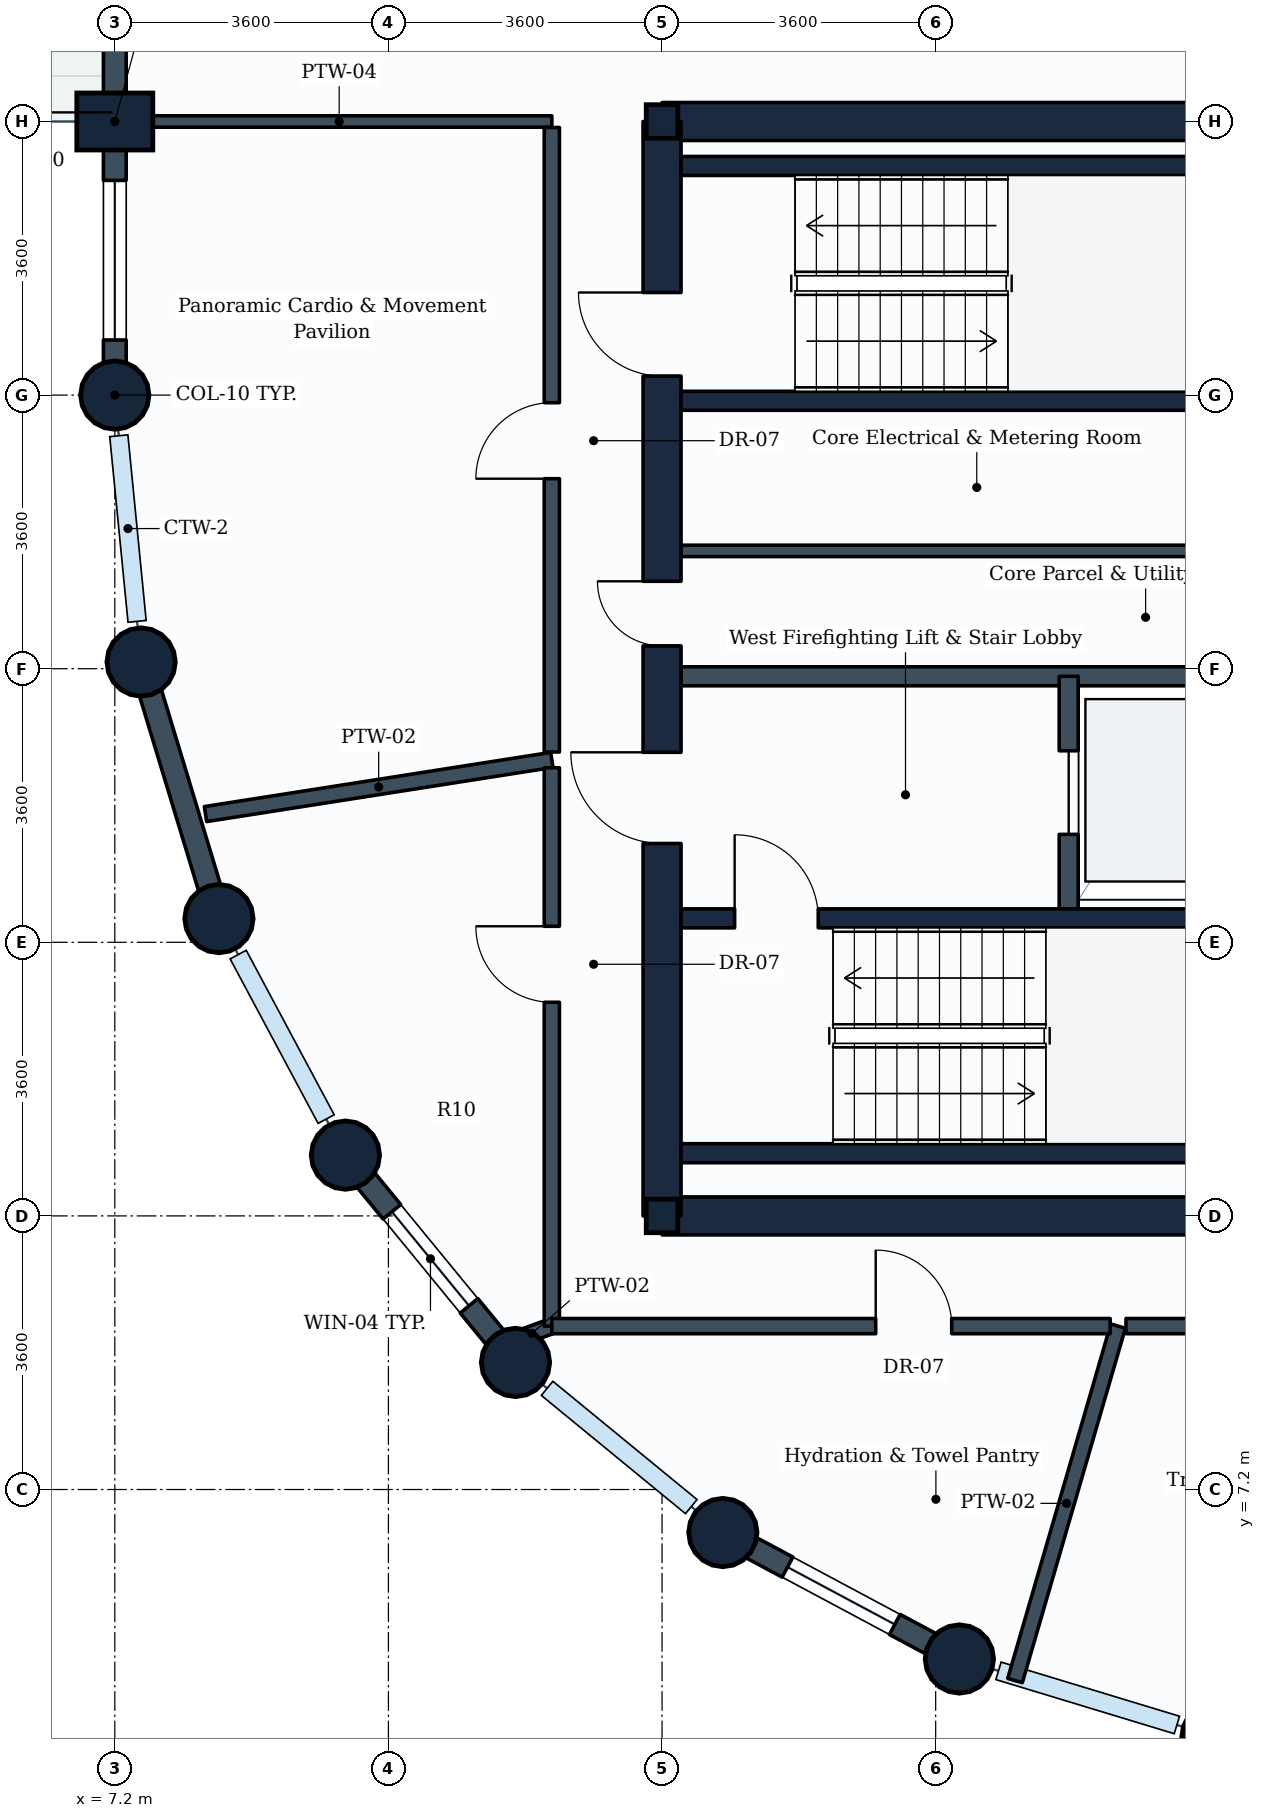
"""IFC4 building model, lengths in metres.
Left out: names, types, materials, properties, quantities, classifications, styles, units other than length and angle.
Written with IfcOpenShell. Run it as: python <this file> out.ifc"""

import sys

from ifc_helpers import new_model, si_unit, direction, frame, frame_2d, origin, origin_2d, place, context, subcontext, project, spatial, rectangle, circle, i_section, extrude, element, fill, save


model = new_model("IFC4")
c1 = context("Model", 3, precision=1e-05, world=origin(), true_north=direction((0.0, 1.0)))
c2 = subcontext(c1, "Body", "Model", "MODEL_VIEW")
j1 = project(units=[si_unit("LENGTHUNIT", "METRE"), si_unit("PLANEANGLEUNIT", "RADIAN")], contexts=[c1])
p1 = place(None, origin())
s1 = spatial("IfcSite", under=j1, at=p1, CompositionType="ELEMENT")
p2 = place(p1, origin())
s2 = spatial("IfcBuilding", under=s1, at=p2, CompositionType="ELEMENT")
p3 = place(p2, frame((0.0, 0.0, 146.6)))
s3 = spatial("IfcBuildingStorey", under=s2, at=p3, CompositionType="ELEMENT", Elevation=146.6)
p4 = place(p3, frame((7.2, 21.6, 0.0), z_axis=(0.0, 0.0, 1.0), x_axis=(1.0, 0.0, 0.0)))
e1 = element("IfcColumn", 1, at=p4, inside=s3, PredefinedType="COLUMN", context=c2, shape_type="SweptSolid", body=[
    extrude(circle(Radius=0.45, at=origin_2d()), origin(), (0.0, 0.0, 1.0), 3.8),
])
p5 = place(p3, frame((7.2, 25.2, 0.0), z_axis=(0.0, 0.0, 1.0), x_axis=(0.0, 1.0, 0.0)))
e2 = element("IfcColumn", 2, at=p5, inside=s3, PredefinedType="COLUMN", context=c2, shape_type="SweptSolid", body=[
    extrude(rectangle(XDim=0.75, YDim=1.0, at=origin_2d()), origin(), (0.0, 0.0, 1.0), 3.8),
])
for number, where, z_axis, x_axis in (
    (3, (7.546, 18.088, 0.0), (0.0, 0.0, 1.0), (1.0, 0.0, 0.0)),
    (4, (8.57, 14.712, 0.0), (0.0, 0.0, 1.0), (1.0, 0.0, 0.0)),
    (5, (10.234, 11.6, 0.0), (0.0, 0.0, 1.0), (1.0, 0.0, 0.0)),
    (6, (12.472, 8.872, 0.0), (0.0, 0.0, 1.0), (1.0, 0.0, 0.0)),
):
    element("IfcColumn", number, at=place(p3, frame(where, z_axis=z_axis, x_axis=x_axis)), inside=s3, PredefinedType="COLUMN", context=c2, shape_type="SweptSolid", body=[
        extrude(circle(Radius=0.45, at=origin_2d()), origin(), (0.0, 0.0, 1.0), 3.8),
    ])
for number, where, z_axis, x_axis in (
    (7, (14.4, 10.8, 0.0), (0.0, 0.0, 1.0), (1.0, 0.0, 0.0)),
    (8, (14.4, 25.2, 0.0), (0.0, 0.0, 1.0), (1.0, 0.0, 0.0)),
):
    element("IfcColumn", number, at=place(p3, frame(where, z_axis=z_axis, x_axis=x_axis)), inside=s3, PredefinedType="COLUMN", context=c2, shape_type="SweptSolid", body=[
        extrude(i_section(OverallWidth=0.416, OverallDepth=0.442, WebThickness=0.025, FlangeThickness=0.041, FilletRadius=0.015, at=origin_2d()), origin(), (0.0, 0.0, 1.0), 3.8),
    ])
for number, where, z_axis, x_axis in (
    (9, (15.2, 6.634, 0.0), (0.0, 0.0, 1.0), (1.0, 0.0, 0.0)),
    (10, (18.312, 4.97, 0.0), (0.0, 0.0, 1.0), (1.0, 0.0, 0.0)),
    (11, (21.688, 3.946, 0.0), (0.0, 0.0, 1.0), (1.0, 0.0, 0.0)),
):
    element("IfcColumn", number, at=place(p3, frame(where, z_axis=z_axis, x_axis=x_axis)), inside=s3, PredefinedType="COLUMN", context=c2, shape_type="SweptSolid", body=[
        extrude(circle(Radius=0.45, at=origin_2d()), origin(), (0.0, 0.0, 1.0), 3.8),
    ])
p6 = place(p3, frame((7.2, 25.2, 0.0), z_axis=(0.0, 0.0, 1.0), x_axis=(0.0, 1.0, 0.0)))
e12 = element("IfcWall", 12, at=p6, inside=s3, PredefinedType="STANDARD", context=c2, shape_type="SweptSolid", body=[
    extrude(rectangle(XDim=3.6, YDim=0.3, at=frame_2d((1.8, 0.0))), origin(), (0.0, 0.0, 1.0), 2.93),
])
p7 = place(p3, frame((7.2, 21.6, 0.0), z_axis=(0.0, 0.0, 1.0), x_axis=(0.0, 1.0, 0.0)))
e13 = element("IfcWall", 13, at=p7, inside=s3, PredefinedType="STANDARD", context=c2, shape_type="SweptSolid", body=[
    extrude(rectangle(XDim=3.6, YDim=0.3, at=frame_2d((1.8, 0.0))), origin(), (0.0, 0.0, 1.0), 2.93),
])
p8 = place(p7, frame((0.725, 0.0, 0.85)))
e14 = element("IfcOpeningElement", 14, at=p8, cuts=e13, PredefinedType="OPENING", context=c2, shape_type="SweptSolid", body=[
    extrude(rectangle(XDim=2.1, YDim=1.35, at=frame_2d((1.05, 0.675))), frame((0.0, 0.16, 0.0), z_axis=(0.0, -1.0, 0.0), x_axis=(1.0, 0.0, 0.0)), (0.0, 0.0, 1.0), 0.32),
])
p9 = place(p3, frame((8.57, 14.712, 0.0), z_axis=(0.0, 0.0, 1.0), x_axis=(-0.290305086481, 0.956934144423, 0.0)))
e15 = element("IfcWall", 15, at=p9, inside=s3, PredefinedType="STANDARD", context=c2, shape_type="SweptSolid", body=[
    extrude(rectangle(XDim=3.528, YDim=0.3, at=frame_2d((1.764, 0.0))), origin(), (0.0, 0.0, 1.0), 2.93),
])
p10 = place(p3, frame((12.472, 8.872, 0.0), z_axis=(0.0, 0.0, 1.0), x_axis=(-0.634258295121, 0.773121216285, 0.0)))
e16 = element("IfcWall", 16, at=p10, inside=s3, PredefinedType="STANDARD", context=c2, shape_type="SweptSolid", body=[
    extrude(rectangle(XDim=3.529, YDim=0.3, at=frame_2d((1.764, 0.0))), origin(), (0.0, 0.0, 1.0), 2.93),
])
p11 = place(p10, frame((0.964, 0.0, 0.85)))
e17 = element("IfcOpeningElement", 17, at=p11, cuts=e16, PredefinedType="OPENING", context=c2, shape_type="SweptSolid", body=[
    extrude(rectangle(XDim=1.6, YDim=1.35, at=frame_2d((0.8, 0.675))), frame((0.0, 0.16, 0.0), z_axis=(0.0, -1.0, 0.0), x_axis=(1.0, 0.0, 0.0)), (0.0, 0.0, 1.0), 0.32),
])
p12 = place(p3, frame((18.312, 4.97, 0.0), z_axis=(0.0, 0.0, 1.0), x_axis=(-0.881846862014, 0.471535907389, 0.0)))
e18 = element("IfcWall", 18, at=p12, inside=s3, PredefinedType="STANDARD", context=c2, shape_type="SweptSolid", body=[
    extrude(rectangle(XDim=3.529, YDim=0.3, at=frame_2d((1.765, 0.0))), origin(), (0.0, 0.0, 1.0), 2.93),
])
p13 = place(p12, frame((0.964, 0.0, 0.85)))
e19 = element("IfcOpeningElement", 19, at=p13, cuts=e18, PredefinedType="OPENING", context=c2, shape_type="SweptSolid", body=[
    extrude(rectangle(XDim=1.6, YDim=1.35, at=frame_2d((0.8, 0.675))), frame((0.0, 0.16, 0.0), z_axis=(0.0, -1.0, 0.0), x_axis=(1.0, 0.0, 0.0)), (0.0, 0.0, 1.0), 0.32),
])
p14 = place(p3, frame((14.4, 10.8, 0.0), z_axis=(0.0, 0.0, 1.0), x_axis=(1.0, 0.0, 0.0)))
e20 = element("IfcWall", 20, at=p14, inside=s3, PredefinedType="SHEAR", context=c2, shape_type="SweptSolid", body=[
    extrude(rectangle(XDim=18.0, YDim=0.5, at=frame_2d((9.0, 0.0))), origin(), (0.0, 0.0, 1.0), 3.55),
])
p15 = place(p3, frame((14.4, 25.2, 0.0), z_axis=(0.0, 0.0, 1.0), x_axis=(1.0, 0.0, 0.0)))
e21 = element("IfcWall", 21, at=p15, inside=s3, PredefinedType="SHEAR", context=c2, shape_type="SweptSolid", body=[
    extrude(rectangle(XDim=14.4, YDim=0.5, at=frame_2d((7.2, 0.0))), origin(), (0.0, 0.0, 1.0), 3.55),
])
p16 = place(p3, frame((14.4, 10.8, 0.0), z_axis=(0.0, 0.0, 1.0), x_axis=(0.0, 1.0, 0.0)))
e22 = element("IfcWall", 22, at=p16, inside=s3, PredefinedType="SHEAR", context=c2, shape_type="SweptSolid", body=[
    extrude(rectangle(XDim=14.4, YDim=0.5, at=frame_2d((7.2, 0.0))), origin(), (0.0, 0.0, 1.0), 3.55),
])
p17 = place(p16, frame((11.05, 0.0, 0.0)))
e23 = element("IfcOpeningElement", 23, at=p17, cuts=e22, PredefinedType="OPENING", context=c2, shape_type="SweptSolid", body=[
    extrude(rectangle(XDim=1.1, YDim=2.1, at=frame_2d((0.55, 1.05))), frame((0.0, 0.26, 0.0), z_axis=(0.0, -1.0, 0.0), x_axis=(1.0, 0.0, 0.0)), (0.0, 0.0, 1.0), 0.52),
])
p18 = place(p16, frame((4.9, 0.0, 0.0)))
e24 = element("IfcOpeningElement", 24, at=p18, cuts=e22, PredefinedType="OPENING", context=c2, shape_type="SweptSolid", body=[
    extrude(rectangle(XDim=1.2, YDim=2.1, at=frame_2d((0.6, 1.05))), frame((0.0, 0.26, 0.0), z_axis=(0.0, -1.0, 0.0), x_axis=(1.0, 0.0, 0.0)), (0.0, 0.0, 1.0), 0.52),
])
p19 = place(p16, frame((7.5, 0.0, 0.0)))
e25 = element("IfcOpeningElement", 25, at=p19, cuts=e22, PredefinedType="OPENING", context=c2, shape_type="SweptSolid", body=[
    extrude(rectangle(XDim=0.85, YDim=2.1, at=frame_2d((0.425, 1.05))), frame((0.0, 0.26, 0.0), z_axis=(0.0, -1.0, 0.0), x_axis=(1.0, 0.0, 0.0)), (0.0, 0.0, 1.0), 0.52),
])
p20 = place(p3, frame((14.65, 11.625, 0.0), z_axis=(0.0, 0.0, 1.0), x_axis=(1.0, 0.0, 0.0)))
e26 = element("IfcWall", 26, at=p20, inside=s3, PredefinedType="SHEAR", context=c2, shape_type="SweptSolid", body=[
    extrude(rectangle(XDim=8.7, YDim=0.25, at=frame_2d((4.35, 0.0))), origin(), (0.0, 0.0, 1.0), 3.55),
])
p21 = place(p3, frame((14.65, 14.715, 0.0), z_axis=(0.0, 0.0, 1.0), x_axis=(1.0, 0.0, 0.0)))
e27 = element("IfcWall", 27, at=p21, inside=s3, PredefinedType="SHEAR", context=c2, shape_type="SweptSolid", body=[
    extrude(rectangle(XDim=8.7, YDim=0.25, at=frame_2d((4.35, 0.0))), origin(), (0.0, 0.0, 1.0), 3.55),
])
p22 = place(p21, frame((0.705, 0.0, 0.0)))
e28 = element("IfcOpeningElement", 28, at=p22, cuts=e27, PredefinedType="OPENING", context=c2, shape_type="SweptSolid", body=[
    extrude(rectangle(XDim=1.1, YDim=2.1, at=frame_2d((0.55, 1.05))), frame((0.0, 0.135, 0.0), z_axis=(0.0, -1.0, 0.0), x_axis=(1.0, 0.0, 0.0)), (0.0, 0.0, 1.0), 0.27),
])
for number, where, z_axis, x_axis in (
    (29, (14.65, 21.525, 0.0), (0.0, 0.0, 1.0), (1.0, 0.0, 0.0)),
    (30, (14.65, 24.615, 0.0), (0.0, 0.0, 1.0), (1.0, 0.0, 0.0)),
):
    element("IfcWall", number, at=place(p3, frame(where, z_axis=z_axis, x_axis=x_axis)), inside=s3, PredefinedType="SHEAR", context=c2, shape_type="SweptSolid", body=[
        extrude(rectangle(XDim=8.25, YDim=0.25, at=frame_2d((4.125, 0.0))), origin(), (0.0, 0.0, 1.0), 3.55),
    ])
p23 = place(p3, frame((14.65, 17.9, 0.0), z_axis=(0.0, 0.0, 1.0), x_axis=(1.0, 0.0, 0.0)))
e31 = element("IfcWall", 31, at=p23, inside=s3, PredefinedType="PARTITIONING", context=c2, shape_type="SweptSolid", body=[
    extrude(rectangle(XDim=7.15, YDim=0.25, at=frame_2d((3.575, 0.0))), origin(), (0.0, 0.0, 1.0), 3.535),
])
p24 = place(p3, frame((19.75, 14.84, 0.0), z_axis=(0.0, 0.0, 1.0), x_axis=(0.0, 1.0, 0.0)))
e32 = element("IfcWall", 32, at=p24, inside=s3, PredefinedType="PARTITIONING", context=c2, shape_type="SweptSolid", body=[
    extrude(rectangle(XDim=3.06, YDim=0.25, at=frame_2d((1.53, 0.0))), origin(), (0.0, 0.0, 1.0), 3.535),
])
p25 = place(p24, frame((0.98, 0.0, 0.0)))
e33 = element("IfcOpeningElement", 33, at=p25, cuts=e32, PredefinedType="OPENING", context=c2, shape_type="SweptSolid", body=[
    extrude(rectangle(XDim=1.1, YDim=2.1, at=frame_2d((0.55, 1.05))), frame((0.0, 0.135, 0.0), z_axis=(0.0, -1.0, 0.0), x_axis=(1.0, 0.0, 0.0)), (0.0, 0.0, 1.0), 0.27),
])
p26 = place(p3, frame((14.65, 19.55, 0.0), z_axis=(0.0, 0.0, 1.0), x_axis=(1.0, 0.0, 0.0)))
e34 = element("IfcWall", 34, at=p26, inside=s3, PredefinedType="PARTITIONING", context=c2, shape_type="SweptSolid", body=[
    extrude(rectangle(XDim=8.0, YDim=0.15, at=frame_2d((4.0, 0.0))), origin(), (0.0, 0.0, 1.0), 3.535),
])
p27 = place(p3, frame((7.354, 25.2, 0.0), z_axis=(0.0, 0.0, 1.0), x_axis=(1.0, 0.0, 0.0)))
e35 = element("IfcWall", 35, at=p27, inside=s3, PredefinedType="PARTITIONING", context=c2, shape_type="SweptSolid", body=[
    extrude(rectangle(XDim=5.596, YDim=0.15, at=frame_2d((2.798, 0.0))), origin(), (0.0, 0.0, 1.0), 3.535),
])
p28 = place(p3, frame((12.95, 16.8, 0.0), z_axis=(0.0, 0.0, 1.0), x_axis=(-0.987973652082, -0.154622323068, 0.0)))
e36 = element("IfcWall", 36, at=p28, inside=s3, PredefinedType="PARTITIONING", context=c2, shape_type="SweptSolid", body=[
    extrude(rectangle(XDim=4.612, YDim=0.2, at=frame_2d((2.306, 0.0))), origin(), (0.0, 0.0, 1.0), 2.93),
])
p29 = place(p3, frame((12.95, 9.35, 0.0), z_axis=(0.0, 0.0, 1.0), x_axis=(-0.939538101119, -0.342444384601, 0.0)))
e37 = element("IfcWall", 37, at=p29, inside=s3, PredefinedType="PARTITIONING", context=c2, shape_type="SweptSolid", body=[
    extrude(rectangle(XDim=0.559, YDim=0.2, at=frame_2d((0.279, 0.0))), origin(), (0.0, 0.0, 1.0), 2.93),
])
p30 = place(p3, frame((20.4, 9.35, 0.0), z_axis=(0.0, 0.0, 1.0), x_axis=(-0.27916607548, -0.960242835069, 0.0)))
e38 = element("IfcWall", 38, at=p30, inside=s3, PredefinedType="PARTITIONING", context=c2, shape_type="SweptSolid", body=[
    extrude(rectangle(XDim=4.857, YDim=0.2, at=frame_2d((2.429, 0.0))), origin(), (0.0, 0.0, 1.0), 2.93),
])
p31 = place(p3, frame((12.95, 16.904, 0.0), z_axis=(0.0, 0.0, 1.0), x_axis=(0.0, 1.0, 0.0)))
e39 = element("IfcWall", 39, at=p31, inside=s3, PredefinedType="PARTITIONING", context=c2, shape_type="SweptSolid", body=[
    extrude(rectangle(XDim=8.217, YDim=0.2, at=frame_2d((4.108, 0.0))), origin(), (0.0, 0.0, 1.0), 3.18),
])
p32 = place(p31, frame((3.596, 0.0, 0.0)))
e40 = element("IfcOpeningElement", 40, at=p32, cuts=e39, PredefinedType="OPENING", context=c2, shape_type="SweptSolid", body=[
    extrude(rectangle(XDim=1.0, YDim=2.1, at=frame_2d((0.5, 1.05))), frame((0.0, 0.11, 0.0), z_axis=(0.0, -1.0, 0.0), x_axis=(1.0, 0.0, 0.0)), (0.0, 0.0, 1.0), 0.22),
])
p33 = place(p3, frame((12.95, 9.35, 0.0), z_axis=(0.0, 0.0, 1.0), x_axis=(0.0, 1.0, 0.0)))
e41 = element("IfcWall", 41, at=p33, inside=s3, PredefinedType="PARTITIONING", context=c2, shape_type="SweptSolid", body=[
    extrude(rectangle(XDim=7.346, YDim=0.2, at=frame_2d((3.673, 0.0))), origin(), (0.0, 0.0, 1.0), 3.17),
])
p34 = place(p33, frame((4.261, 0.0, 0.0)))
e42 = element("IfcOpeningElement", 42, at=p34, cuts=e41, PredefinedType="OPENING", context=c2, shape_type="SweptSolid", body=[
    extrude(rectangle(XDim=1.0, YDim=2.1, at=frame_2d((0.5, 1.05))), frame((0.0, 0.11, 0.0), z_axis=(0.0, -1.0, 0.0), x_axis=(1.0, 0.0, 0.0)), (0.0, 0.0, 1.0), 0.22),
])
p35 = place(p3, frame((12.95, 9.35, 0.0), z_axis=(0.0, 0.0, 1.0), x_axis=(1.0, 0.0, 0.0)))
e43 = element("IfcWall", 43, at=p35, inside=s3, PredefinedType="PARTITIONING", context=c2, shape_type="SweptSolid", body=[
    extrude(rectangle(XDim=7.346, YDim=0.2, at=frame_2d((3.673, 0.0))), origin(), (0.0, 0.0, 1.0), 3.18),
])
p36 = place(p35, frame((4.261, 0.0, 0.0)))
e44 = element("IfcOpeningElement", 44, at=p36, cuts=e43, PredefinedType="OPENING", context=c2, shape_type="SweptSolid", body=[
    extrude(rectangle(XDim=1.0, YDim=2.1, at=frame_2d((0.5, 1.05))), frame((0.0, 0.11, 0.0), z_axis=(0.0, -1.0, 0.0), x_axis=(1.0, 0.0, 0.0)), (0.0, 0.0, 1.0), 0.22),
])
p37 = place(p3, frame((20.504, 9.35, 0.0), z_axis=(0.0, 0.0, 1.0), x_axis=(1.0, 0.0, 0.0)))
e45 = element("IfcWall", 45, at=p37, inside=s3, PredefinedType="PARTITIONING", context=c2, shape_type="SweptSolid", body=[
    extrude(rectangle(XDim=8.217, YDim=0.2, at=frame_2d((4.108, 0.0))), origin(), (0.0, 0.0, 1.0), 3.17),
])
p38 = place(p37, frame((3.914, 0.0, 0.0)))
e46 = element("IfcOpeningElement", 46, at=p38, cuts=e45, PredefinedType="OPENING", context=c2, shape_type="SweptSolid", body=[
    extrude(rectangle(XDim=1.0, YDim=2.1, at=frame_2d((0.5, 1.05))), frame((0.0, 0.11, 0.0), z_axis=(0.0, -1.0, 0.0), x_axis=(1.0, 0.0, 0.0)), (0.0, 0.0, 1.0), 0.22),
])
p39 = place(p8, origin())
e47 = element("IfcWindow", 47, at=p39, inside=s3, PartitioningType="SINGLE_PANEL", PredefinedType="WINDOW", context=c2, shape_type="SweptSolid", body=[
    extrude(rectangle(XDim=2.1, YDim=1.35, at=frame_2d((1.05, 0.675))), frame((0.0, 0.03, 0.0), z_axis=(0.0, -1.0, 0.0), x_axis=(1.0, 0.0, 0.0)), (0.0, 0.0, 1.0), 0.06),
])
fill(e14, e47)
p40 = place(p11, origin())
e48 = element("IfcWindow", 48, at=p40, inside=s3, PartitioningType="SINGLE_PANEL", PredefinedType="WINDOW", context=c2, shape_type="SweptSolid", body=[
    extrude(rectangle(XDim=1.6, YDim=1.35, at=frame_2d((0.8, 0.675))), frame((0.0, 0.03, 0.0), z_axis=(0.0, -1.0, 0.0), x_axis=(1.0, 0.0, 0.0)), (0.0, 0.0, 1.0), 0.06),
])
fill(e17, e48)
p41 = place(p13, origin())
e49 = element("IfcWindow", 49, at=p41, inside=s3, PartitioningType="SINGLE_PANEL", PredefinedType="WINDOW", context=c2, shape_type="SweptSolid", body=[
    extrude(rectangle(XDim=1.6, YDim=1.35, at=frame_2d((0.8, 0.675))), frame((0.0, 0.03, 0.0), z_axis=(0.0, -1.0, 0.0), x_axis=(1.0, 0.0, 0.0)), (0.0, 0.0, 1.0), 0.06),
])
fill(e19, e49)
p42 = place(p22, origin())
e50 = element("IfcDoor", 50, at=p42, inside=s3, OperationType="SINGLE_SWING_LEFT", PredefinedType="DOOR", context=c2, shape_type="SweptSolid", body=[
    extrude(rectangle(XDim=1.1, YDim=2.1, at=frame_2d((0.55, 1.05))), frame((0.0, 0.025, 0.0), z_axis=(0.0, -1.0, 0.0), x_axis=(1.0, 0.0, 0.0)), (0.0, 0.0, 1.0), 0.05),
])
fill(e28, e50)
p43 = place(p17, origin())
e51 = element("IfcDoor", 51, at=p43, inside=s3, OperationType="SINGLE_SWING_RIGHT", PredefinedType="DOOR", context=c2, shape_type="SweptSolid", body=[
    extrude(rectangle(XDim=1.1, YDim=2.1, at=frame_2d((0.55, 1.05))), frame((0.0, 0.025, 0.0), z_axis=(0.0, -1.0, 0.0), x_axis=(1.0, 0.0, 0.0)), (0.0, 0.0, 1.0), 0.05),
])
fill(e23, e51)
p44 = place(p25, origin())
e52 = element("IfcDoor", 52, at=p44, inside=s3, OperationType="SLIDING_TO_LEFT", PredefinedType="DOOR", context=c2, shape_type="SweptSolid", body=[
    extrude(rectangle(XDim=1.1, YDim=2.1, at=frame_2d((0.55, 1.05))), frame((0.0, 0.025, 0.0), z_axis=(0.0, -1.0, 0.0), x_axis=(1.0, 0.0, 0.0)), (0.0, 0.0, 1.0), 0.05),
])
fill(e33, e52)
p45 = place(p18, origin())
e53 = element("IfcDoor", 53, at=p45, inside=s3, OperationType="SINGLE_SWING_RIGHT", PredefinedType="DOOR", context=c2, shape_type="SweptSolid", body=[
    extrude(rectangle(XDim=1.2, YDim=2.1, at=frame_2d((0.6, 1.05))), frame((0.0, 0.025, 0.0), z_axis=(0.0, -1.0, 0.0), x_axis=(1.0, 0.0, 0.0)), (0.0, 0.0, 1.0), 0.05),
])
fill(e24, e53)
p46 = place(p19, origin())
e54 = element("IfcDoor", 54, at=p46, inside=s3, OperationType="SINGLE_SWING_RIGHT", PredefinedType="DOOR", context=c2, shape_type="SweptSolid", body=[
    extrude(rectangle(XDim=0.85, YDim=2.1, at=frame_2d((0.425, 1.05))), frame((0.0, 0.025, 0.0), z_axis=(0.0, -1.0, 0.0), x_axis=(1.0, 0.0, 0.0)), (0.0, 0.0, 1.0), 0.05),
])
fill(e25, e54)
p47 = place(p32, origin())
e55 = element("IfcDoor", 55, at=p47, inside=s3, OperationType="SINGLE_SWING_LEFT", PredefinedType="DOOR", context=c2, shape_type="SweptSolid", body=[
    extrude(rectangle(XDim=1.0, YDim=2.1, at=frame_2d((0.5, 1.05))), frame((0.0, 0.025, 0.0), z_axis=(0.0, -1.0, 0.0), x_axis=(1.0, 0.0, 0.0)), (0.0, 0.0, 1.0), 0.05),
])
fill(e40, e55)
p48 = place(p34, origin())
e56 = element("IfcDoor", 56, at=p48, inside=s3, OperationType="SINGLE_SWING_RIGHT", PredefinedType="DOOR", context=c2, shape_type="SweptSolid", body=[
    extrude(rectangle(XDim=1.0, YDim=2.1, at=frame_2d((0.5, 1.05))), frame((0.0, 0.025, 0.0), z_axis=(0.0, -1.0, 0.0), x_axis=(1.0, 0.0, 0.0)), (0.0, 0.0, 1.0), 0.05),
])
fill(e42, e56)
p49 = place(p36, origin())
e57 = element("IfcDoor", 57, at=p49, inside=s3, OperationType="SINGLE_SWING_LEFT", PredefinedType="DOOR", context=c2, shape_type="SweptSolid", body=[
    extrude(rectangle(XDim=1.0, YDim=2.1, at=frame_2d((0.5, 1.05))), frame((0.0, 0.025, 0.0), z_axis=(0.0, -1.0, 0.0), x_axis=(1.0, 0.0, 0.0)), (0.0, 0.0, 1.0), 0.05),
])
fill(e44, e57)
save(model, sys.argv[1])
